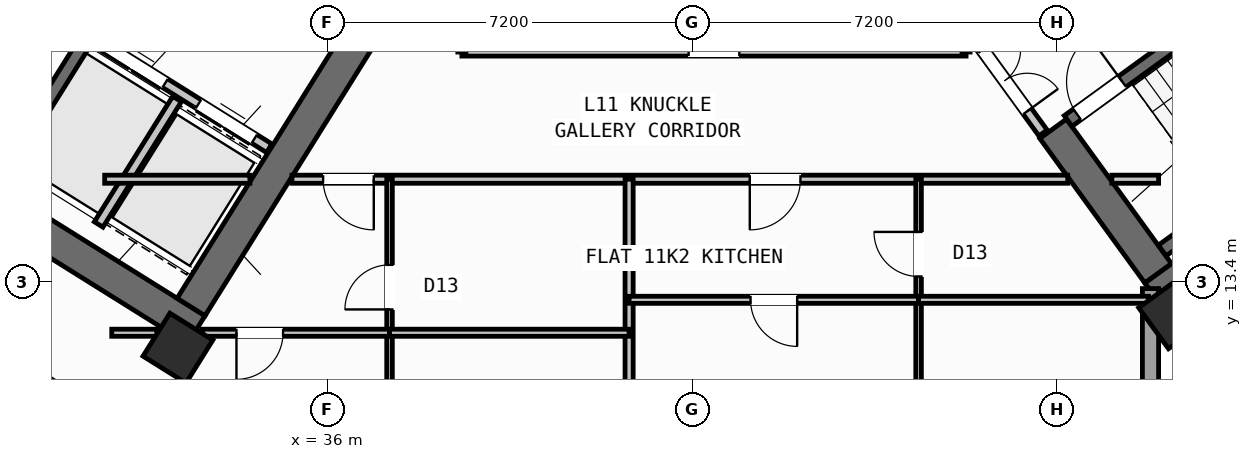
"""IFC4 building model, lengths in metres.
Left out: names, types, materials, properties, quantities, classifications, styles, units other than length and angle.
Written with IfcOpenShell. Run it as: python <this file> out.ifc"""

import sys

from ifc_helpers import new_model, si_unit, direction, frame, frame_2d, origin, origin_2d, place, context, subcontext, project, spatial, rectangle, hollow_rectangle, extrude, source, transform, mapped, element, fill, save


model = new_model("IFC4")
c1 = context("Model", 3, precision=1e-05, world=origin(), true_north=direction((0.0, 1.0)))
c2 = subcontext(c1, "Body", "Model", "MODEL_VIEW")
j1 = project(units=[si_unit("LENGTHUNIT", "METRE"), si_unit("PLANEANGLEUNIT", "RADIAN")], contexts=[c1])
p1 = place(None, origin())
s1 = spatial("IfcSite", under=j1, at=p1, CompositionType="ELEMENT")
p2 = place(p1, origin())
s2 = spatial("IfcBuilding", under=s1, at=p2, CompositionType="ELEMENT")
p3 = place(p2, frame((0.0, 0.0, 45.6)))
s3 = spatial("IfcBuildingStorey", under=s2, at=p3, CompositionType="ELEMENT", Elevation=45.6)
p4 = place(p3, frame((33.409, 12.45, 0.0), z_axis=(0.0, 0.0, 1.0), x_axis=(-0.848051132073, 0.529914405721, 0.0)))
e1 = element("IfcWall", 1, at=p4, inside=s3, PredefinedType="SHEAR", context=c2, shape_type="SweptSolid", body=[
    extrude(rectangle(XDim=13.24, YDim=0.65, at=frame_2d((6.62, 0.0))), origin(), (0.0, 0.0, 1.0), 3.35),
])
p5 = place(p3, frame((36.683, 18.304, 0.0), z_axis=(0.0, 0.0, 1.0), x_axis=(-0.529899109053, -0.848060690178, 0.0)))
e2 = element("IfcWall", 2, at=p5, inside=s3, PredefinedType="SHEAR", context=c2, shape_type="SweptSolid", body=[
    extrude(rectangle(XDim=6.375, YDim=0.65, at=frame_2d((3.188, 0.0))), origin(), (0.0, 0.0, 1.0), 3.35),
])
p6 = place(p3, frame((52.318, 13.11, 0.0), z_axis=(0.0, 0.0, 1.0), x_axis=(0.809019445368, 0.587781878776, 0.0)))
e3 = element("IfcWall", 3, at=p6, inside=s3, PredefinedType="SHEAR", context=c2, shape_type="SweptSolid", body=[
    extrude(rectangle(XDim=12.44, YDim=0.65, at=frame_2d((6.22, 0.0))), origin(), (0.0, 0.0, 1.0), 3.35),
])
p7 = place(p3, frame((52.39, 13.564, 0.0), z_axis=(0.0, 0.0, 1.0), x_axis=(-0.58779688989, 0.809008539037, 0.0)))
e4 = element("IfcWall", 4, at=p7, inside=s3, PredefinedType="SHEAR", context=c2, shape_type="SweptSolid", body=[
    extrude(rectangle(XDim=3.525, YDim=0.65, at=frame_2d((1.763, 0.0))), origin(), (0.0, 0.0, 1.0), 3.35),
])
m1 = source(origin(), c2, "Body", "SweptSolid", [
    extrude(hollow_rectangle(XDim=1.0, YDim=1.0, WallThickness=0.04, at=origin_2d()), origin(), (0.0, 0.0, 1.0), 3.6),
])
for number, where, z_axis, x_axis in (
    (5, (33.046, 12.087, 0.0), (0.0, 0.0, 1.0), (-0.848, 0.53, 0.0)),
    (6, (52.705, 12.773, 0.0), (0.0, 0.0, 1.0), (0.809, 0.588, 0.0)),
):
    element("IfcColumn", number, at=place(p3, frame(where, z_axis=z_axis, x_axis=x_axis)), inside=s3, PredefinedType="COLUMN", context=c2, shape_type="MappedRepresentation", body=[
        mapped(m1, transform((0.0, 0.0, 0.0), scale=1.0)),
    ])
p8 = place(p3, frame((56.581, 7.439, 0.0), z_axis=(0.0, 0.0, 1.0), x_axis=(-0.587785875463, 0.809016541614, 0.0)))
e7 = element("IfcWall", 7, at=p8, inside=s3, PredefinedType="STANDARD", context=c2, shape_type="SweptSolid", body=[
    extrude(rectangle(XDim=6.774, YDim=0.32, at=frame_2d((3.387, 0.0))), origin(), (0.0, 0.0, 1.0), 2.725),
])
p9 = place(p8, frame((1.556, 0.0, 0.8)))
e8 = element("IfcOpeningElement", 8, at=p9, cuts=e7, PredefinedType="OPENING", context=c2, shape_type="SweptSolid", body=[
    extrude(rectangle(XDim=2.1, YDim=1.55, at=frame_2d((1.05, 0.775))), frame((0.0, 0.17, 0.0), z_axis=(0.0, -1.0, 0.0), x_axis=(1.0, 0.0, 0.0)), (0.0, 0.0, 1.0), 0.34),
])
p10 = place(p3, frame((52.24, 13.261, 0.0), z_axis=(0.0, 0.0, 1.0), x_axis=(0.0, -1.0, 0.0)))
e9 = element("IfcWall", 9, at=p10, inside=s3, PredefinedType="STANDARD", context=c2, shape_type="SweptSolid", body=[
    extrude(rectangle(XDim=9.795, YDim=0.32, at=frame_2d((4.897, 0.0))), origin(), (0.0, 0.0, 1.0), 3.35),
])
p11 = place(p10, frame((2.349, 0.0, 0.8)))
e10 = element("IfcOpeningElement", 10, at=p11, cuts=e9, PredefinedType="OPENING", context=c2, shape_type="SweptSolid", body=[
    extrude(rectangle(XDim=2.1, YDim=1.55, at=frame_2d((1.05, 0.775))), frame((0.0, 0.17, 0.0), z_axis=(0.0, -1.0, 0.0), x_axis=(1.0, 0.0, 0.0)), (0.0, 0.0, 1.0), 0.34),
])
p12 = place(p10, frame((7.03, 0.0, 0.85)))
e11 = element("IfcOpeningElement", 11, at=p12, cuts=e9, PredefinedType="OPENING", context=c2, shape_type="SweptSolid", body=[
    extrude(rectangle(XDim=1.8, YDim=1.5, at=frame_2d((0.9, 0.75))), frame((0.0, 0.17, 0.0), z_axis=(0.0, -1.0, 0.0), x_axis=(1.0, 0.0, 0.0)), (0.0, 0.0, 1.0), 0.34),
])
p13 = place(p3, frame((31.288, 18.256, 0.0), z_axis=(0.0, 0.0, 1.0), x_axis=(-0.529943379326, -0.848033026897, 0.0)))
e12 = element("IfcWall", 12, at=p13, inside=s3, PredefinedType="SHEAR", context=c2, shape_type="SweptSolid", body=[
    extrude(rectangle(XDim=3.16, YDim=0.26, at=frame_2d((1.58, 0.0))), origin(), (0.0, 0.0, 1.0), 3.35),
])
p14 = place(p3, frame((34.848, 16.031, 0.0), z_axis=(0.0, 0.0, 1.0), x_axis=(-0.848044042236, 0.529925751807, 0.0)))
e13 = element("IfcWall", 13, at=p14, inside=s3, PredefinedType="STANDARD", context=c2, shape_type="SweptSolid", body=[
    extrude(rectangle(XDim=4.198, YDim=0.2, at=frame_2d((2.099, 0.0))), origin(), (0.0, 0.0, 1.0), 3.34),
])
p15 = place(p14, frame((0.348, 0.0, 0.0)))
e14 = element("IfcOpeningElement", 14, at=p15, cuts=e13, PredefinedType="OPENING", context=c2, shape_type="SweptSolid", body=[
    extrude(rectangle(XDim=1.3, YDim=2.2, at=frame_2d((0.65, 1.1))), frame((0.0, 0.11, 0.0), z_axis=(0.0, -1.0, 0.0), x_axis=(1.0, 0.0, 0.0)), (0.0, 0.0, 1.0), 0.22),
])
p16 = place(p14, frame((2.423, 0.0, 0.0)))
e15 = element("IfcOpeningElement", 15, at=p16, cuts=e13, PredefinedType="OPENING", context=c2, shape_type="SweptSolid", body=[
    extrude(rectangle(XDim=1.45, YDim=2.25, at=frame_2d((0.725, 1.125))), frame((0.0, 0.11, 0.0), z_axis=(0.0, -1.0, 0.0), x_axis=(1.0, 0.0, 0.0)), (0.0, 0.0, 1.0), 0.22),
])
p17 = place(p3, frame((33.029, 17.003, 0.0), z_axis=(0.0, 0.0, 1.0), x_axis=(-0.529916267533, -0.848049968695, 0.0)))
e16 = element("IfcWall", 16, at=p17, inside=s3, PredefinedType="STANDARD", context=c2, shape_type="SweptSolid", body=[
    extrude(rectangle(XDim=2.92, YDim=0.2, at=frame_2d((1.46, 0.0))), origin(), (0.0, 0.0, 1.0), 3.34),
])
p18 = place(p3, frame((52.472, 14.013, 0.0), z_axis=(0.0, 0.0, 1.0), x_axis=(0.809028366311, 0.587769599847, 0.0)))
e17 = element("IfcWall", 17, at=p18, inside=s3, PredefinedType="SHEAR", context=c2, shape_type="SweptSolid", body=[
    extrude(rectangle(XDim=7.33, YDim=0.26, at=frame_2d((3.665, 0.0))), origin(), (0.0, 0.0, 1.0), 3.35),
])
p19 = place(p3, frame((50.615, 16.57, 0.0), z_axis=(0.0, 0.0, 1.0), x_axis=(0.809028366311, 0.587769599847, 0.0)))
e18 = element("IfcWall", 18, at=p19, inside=s3, PredefinedType="SHEAR", context=c2, shape_type="SweptSolid", body=[
    extrude(rectangle(XDim=7.33, YDim=0.26, at=frame_2d((3.665, 0.0))), origin(), (0.0, 0.0, 1.0), 3.35),
])
p20 = place(p19, frame((0.22, 0.0, 0.0)))
e19 = element("IfcOpeningElement", 19, at=p20, cuts=e18, PredefinedType="OPENING", context=c2, shape_type="SweptSolid", body=[
    extrude(rectangle(XDim=1.1, YDim=2.1, at=frame_2d((0.55, 1.05))), frame((0.0, 0.14, 0.0), z_axis=(0.0, -1.0, 0.0), x_axis=(1.0, 0.0, 0.0)), (0.0, 0.0, 1.0), 0.28),
])
p21 = place(p3, frame((32.164, 10.374, 0.0), z_axis=(0.0, 0.0, 1.0), x_axis=(-0.848044107957, 0.529925646633, 0.0)))
e20 = element("IfcWall", 20, at=p21, inside=s3, PredefinedType="PARTITIONING", context=c2, shape_type="SweptSolid", body=[
    extrude(rectangle(XDim=15.57, YDim=0.16, at=frame_2d((7.785, 0.0))), origin(), (0.0, 0.0, 1.0), 3.34),
])
p22 = place(p21, frame((10.83, 0.0, 0.0)))
e21 = element("IfcOpeningElement", 21, at=p22, cuts=e20, PredefinedType="OPENING", context=c2, shape_type="SweptSolid", body=[
    extrude(rectangle(XDim=1.0, YDim=2.1, at=frame_2d((0.5, 1.05))), frame((0.0, 0.09, 0.0), z_axis=(0.0, -1.0, 0.0), x_axis=(1.0, 0.0, 0.0)), (0.0, 0.0, 1.0), 0.18),
])
p23 = place(p3, frame((31.6, 15.42, 0.0), z_axis=(0.0, 0.0, 1.0), x_axis=(1.0, 0.0, 0.0)))
e22 = element("IfcWall", 22, at=p23, inside=s3, PredefinedType="PARTITIONING", context=c2, shape_type="SweptSolid", body=[
    extrude(rectangle(XDim=2.866, YDim=0.16, at=frame_2d((1.433, 0.0))), origin(), (0.0, 0.0, 1.0), 3.34),
])
p24 = place(p3, frame((35.296, 15.42, 0.0), z_axis=(0.0, 0.0, 1.0), x_axis=(1.0, 0.0, 0.0)))
e23 = element("IfcWall", 23, at=p24, inside=s3, PredefinedType="PARTITIONING", context=c2, shape_type="SweptSolid", body=[
    extrude(rectangle(XDim=15.311, YDim=0.16, at=frame_2d((7.655, 0.0))), origin(), (0.0, 0.0, 1.0), 3.34),
])
p25 = place(p24, frame((0.615, 0.0, 0.0)))
e24 = element("IfcOpeningElement", 24, at=p25, cuts=e23, PredefinedType="OPENING", context=c2, shape_type="SweptSolid", body=[
    extrude(rectangle(XDim=1.0, YDim=2.1, at=frame_2d((0.5, 1.05))), frame((0.0, 0.09, 0.0), z_axis=(0.0, -1.0, 0.0), x_axis=(1.0, 0.0, 0.0)), (0.0, 0.0, 1.0), 0.18),
])
p26 = place(p24, frame((9.035, 0.0, 0.0)))
e25 = element("IfcOpeningElement", 25, at=p26, cuts=e23, PredefinedType="OPENING", context=c2, shape_type="SweptSolid", body=[
    extrude(rectangle(XDim=1.0, YDim=2.1, at=frame_2d((0.5, 1.05))), frame((0.0, 0.09, 0.0), z_axis=(0.0, -1.0, 0.0), x_axis=(1.0, 0.0, 0.0)), (0.0, 0.0, 1.0), 0.18),
])
p27 = place(p3, frame((51.477, 15.42, 0.0), z_axis=(0.0, 0.0, 1.0), x_axis=(1.0, 0.0, 0.0)))
e26 = element("IfcWall", 26, at=p27, inside=s3, PredefinedType="PARTITIONING", context=c2, shape_type="SweptSolid", body=[
    extrude(rectangle(XDim=0.923, YDim=0.16, at=frame_2d((0.461, 0.0))), origin(), (0.0, 0.0, 1.0), 3.34),
])
p28 = place(p3, frame((38.65, 17.93, 0.0), z_axis=(0.0, 0.0, 1.0), x_axis=(1.0, 0.0, 0.0)))
e27 = element("IfcWall", 27, at=p28, inside=s3, PredefinedType="PARTITIONING", context=c2, shape_type="SweptSolid", body=[
    extrude(rectangle(XDim=9.95, YDim=0.16, at=frame_2d((4.975, 0.0))), origin(), (0.0, 0.0, 1.0), 3.34),
])
p29 = place(p28, frame((4.475, 0.0, 0.0)))
e28 = element("IfcOpeningElement", 28, at=p29, cuts=e27, PredefinedType="OPENING", context=c2, shape_type="SweptSolid", body=[
    extrude(rectangle(XDim=1.0, YDim=2.1, at=frame_2d((0.5, 1.05))), frame((0.0, 0.09, 0.0), z_axis=(0.0, -1.0, 0.0), x_axis=(1.0, 0.0, 0.0)), (0.0, 0.0, 1.0), 0.18),
])
p30 = place(p3, frame((50.119, 16.333, 0.0), z_axis=(0.0, 0.0, 1.0), x_axis=(-0.587749856981, 0.809042709391, 0.0)))
e29 = element("IfcWall", 29, at=p30, inside=s3, PredefinedType="STANDARD", context=c2, shape_type="SweptSolid", body=[
    extrude(rectangle(XDim=2.96, YDim=0.2, at=frame_2d((1.48, 0.0))), origin(), (0.0, 0.0, 1.0), 3.34),
])
p31 = place(p30, frame((0.53, 0.0, 0.0)))
e30 = element("IfcOpeningElement", 30, at=p31, cuts=e29, PredefinedType="OPENING", context=c2, shape_type="SweptSolid", body=[
    extrude(rectangle(XDim=1.5, YDim=2.15, at=frame_2d((0.75, 1.075))), frame((0.0, 0.11, 0.0), z_axis=(0.0, -1.0, 0.0), x_axis=(1.0, 0.0, 0.0)), (0.0, 0.0, 1.0), 0.22),
])
p32 = place(p3, frame((41.95, 1.96, 0.0), z_axis=(0.0, 0.0, 1.0), x_axis=(0.0, 1.0, 0.0)))
e31 = element("IfcWall", 31, at=p32, inside=s3, PredefinedType="PARTITIONING", context=c2, shape_type="SweptSolid", body=[
    extrude(rectangle(XDim=13.46, YDim=0.16, at=frame_2d((6.73, 0.0))), origin(), (0.0, 0.0, 1.0), 3.34),
])
p33 = place(p3, frame((37.222, 1.96, 0.0), z_axis=(0.0, 0.0, 1.0), x_axis=(0.0, 1.0, 0.0)))
e32 = element("IfcWall", 32, at=p33, inside=s3, PredefinedType="PARTITIONING", context=c2, shape_type="SweptSolid", body=[
    extrude(rectangle(XDim=13.46, YDim=0.11, at=frame_2d((6.73, 0.0))), origin(), (0.0, 0.0, 1.0), 3.34),
])
p34 = place(p33, frame((5.2, 0.0, 0.0)))
e33 = element("IfcOpeningElement", 33, at=p34, cuts=e32, PredefinedType="OPENING", context=c2, shape_type="SweptSolid", body=[
    extrude(rectangle(XDim=0.92, YDim=2.08, at=frame_2d((0.46, 1.04))), frame((0.0, 0.065, 0.0), z_axis=(0.0, -1.0, 0.0), x_axis=(1.0, 0.0, 0.0)), (0.0, 0.0, 1.0), 0.13),
])
p35 = place(p33, frame((10.89, 0.0, 0.0)))
e34 = element("IfcOpeningElement", 34, at=p35, cuts=e32, PredefinedType="OPENING", context=c2, shape_type="SweptSolid", body=[
    extrude(rectangle(XDim=0.88, YDim=2.08, at=frame_2d((0.44, 1.04))), frame((0.0, 0.065, 0.0), z_axis=(0.0, -1.0, 0.0), x_axis=(1.0, 0.0, 0.0)), (0.0, 0.0, 1.0), 0.13),
])
p36 = place(p3, frame((31.74, 12.39, 0.0), z_axis=(0.0, 0.0, 1.0), x_axis=(1.0, 0.0, 0.0)))
e35 = element("IfcWall", 35, at=p36, inside=s3, PredefinedType="PLUMBINGWALL", context=c2, shape_type="SweptSolid", body=[
    extrude(rectangle(XDim=0.892, YDim=0.14, at=frame_2d((0.446, 0.0))), origin(), (0.0, 0.0, 1.0), 3.34),
])
p37 = place(p3, frame((33.527, 12.39, 0.0), z_axis=(0.0, 0.0, 1.0), x_axis=(1.0, 0.0, 0.0)))
e36 = element("IfcWall", 36, at=p37, inside=s3, PredefinedType="PLUMBINGWALL", context=c2, shape_type="SweptSolid", body=[
    extrude(rectangle(XDim=3.695, YDim=0.14, at=frame_2d((1.847, 0.0))), origin(), (0.0, 0.0, 1.0), 2.525),
])
p38 = place(p37, frame((0.674, 0.0, 0.0)))
e37 = element("IfcOpeningElement", 37, at=p38, cuts=e36, PredefinedType="OPENING", context=c2, shape_type="SweptSolid", body=[
    extrude(rectangle(XDim=0.92, YDim=2.08, at=frame_2d((0.46, 1.04))), frame((0.0, 0.08, 0.0), z_axis=(0.0, -1.0, 0.0), x_axis=(1.0, 0.0, 0.0)), (0.0, 0.0, 1.0), 0.16),
])
p39 = place(p3, frame((37.222, 12.39, 0.0), z_axis=(0.0, 0.0, 1.0), x_axis=(1.0, 0.0, 0.0)))
e38 = element("IfcWall", 38, at=p39, inside=s3, PredefinedType="PLUMBINGWALL", context=c2, shape_type="SweptSolid", body=[
    extrude(rectangle(XDim=4.728, YDim=0.14, at=frame_2d((2.364, 0.0))), origin(), (0.0, 0.0, 1.0), 2.525),
])
p40 = place(p3, frame((47.663, 1.96, 0.0), z_axis=(0.0, 0.0, 1.0), x_axis=(0.0, 1.0, 0.0)))
e39 = element("IfcWall", 39, at=p40, inside=s3, PredefinedType="PARTITIONING", context=c2, shape_type="SweptSolid", body=[
    extrude(rectangle(XDim=13.46, YDim=0.11, at=frame_2d((6.73, 0.0))), origin(), (0.0, 0.0, 1.0), 3.34),
])
p41 = place(p40, frame((6.3, 0.0, 0.0)))
e40 = element("IfcOpeningElement", 40, at=p41, cuts=e39, PredefinedType="OPENING", context=c2, shape_type="SweptSolid", body=[
    extrude(rectangle(XDim=0.92, YDim=2.08, at=frame_2d((0.46, 1.04))), frame((0.0, 0.065, 0.0), z_axis=(0.0, -1.0, 0.0), x_axis=(1.0, 0.0, 0.0)), (0.0, 0.0, 1.0), 0.13),
])
p42 = place(p40, frame((11.54, 0.0, 0.0)))
e41 = element("IfcOpeningElement", 41, at=p42, cuts=e39, PredefinedType="OPENING", context=c2, shape_type="SweptSolid", body=[
    extrude(rectangle(XDim=0.88, YDim=2.08, at=frame_2d((0.44, 1.04))), frame((0.0, 0.065, 0.0), z_axis=(0.0, -1.0, 0.0), x_axis=(1.0, 0.0, 0.0)), (0.0, 0.0, 1.0), 0.13),
])
p43 = place(p3, frame((41.95, 13.04, 0.0), z_axis=(0.0, 0.0, 1.0), x_axis=(1.0, 0.0, 0.0)))
e42 = element("IfcWall", 42, at=p43, inside=s3, PredefinedType="PLUMBINGWALL", context=c2, shape_type="SweptSolid", body=[
    extrude(rectangle(XDim=5.713, YDim=0.14, at=frame_2d((2.856, 0.0))), origin(), (0.0, 0.0, 1.0), 3.34),
])
p44 = place(p43, frame((2.396, 0.0, 0.0)))
e43 = element("IfcOpeningElement", 43, at=p44, cuts=e42, PredefinedType="OPENING", context=c2, shape_type="SweptSolid", body=[
    extrude(rectangle(XDim=0.92, YDim=2.08, at=frame_2d((0.46, 1.04))), frame((0.0, 0.08, 0.0), z_axis=(0.0, -1.0, 0.0), x_axis=(1.0, 0.0, 0.0)), (0.0, 0.0, 1.0), 0.16),
])
p45 = place(p3, frame((47.663, 13.04, 0.0), z_axis=(0.0, 0.0, 1.0), x_axis=(1.0, 0.0, 0.0)))
e44 = element("IfcWall", 44, at=p45, inside=s3, PredefinedType="PLUMBINGWALL", context=c2, shape_type="SweptSolid", body=[
    extrude(rectangle(XDim=4.538, YDim=0.14, at=frame_2d((2.269, 0.0))), origin(), (0.0, 0.0, 1.0), 2.525),
])
m2 = source(origin(), c2, "Body", "SweptSolid", [
    extrude(rectangle(XDim=1.3, YDim=2.2, at=frame_2d((0.65, 1.1))), frame((0.0, 0.025, 0.0), z_axis=(0.0, -1.0, 0.0), x_axis=(1.0, 0.0, 0.0)), (0.0, 0.0, 1.0), 0.05),
])
p46 = place(p15, origin())
e45 = element("IfcDoor", 45, at=p46, inside=s3, OperationType="DOUBLE_DOOR_SLIDING", PredefinedType="DOOR", context=c2, shape_type="MappedRepresentation", body=[
    mapped(m2, transform((0.0, 0.0, 0.0), scale=1.0)),
])
fill(e14, e45)
m3 = source(origin(), c2, "Body", "SweptSolid", [
    extrude(rectangle(XDim=1.45, YDim=2.25, at=frame_2d((0.725, 1.125))), frame((0.0, 0.025, 0.0), z_axis=(0.0, -1.0, 0.0), x_axis=(1.0, 0.0, 0.0)), (0.0, 0.0, 1.0), 0.05),
])
p47 = place(p16, origin())
e46 = element("IfcDoor", 46, at=p47, inside=s3, OperationType="DOUBLE_DOOR_SLIDING", PredefinedType="DOOR", context=c2, shape_type="MappedRepresentation", body=[
    mapped(m3, transform((0.0, 0.0, 0.0), scale=1.0)),
])
fill(e15, e46)
m4 = source(origin(), c2, "Body", "SweptSolid", [
    extrude(rectangle(XDim=1.1, YDim=2.1, at=frame_2d((0.55, 1.05))), frame((0.0, 0.025, 0.0), z_axis=(0.0, -1.0, 0.0), x_axis=(1.0, 0.0, 0.0)), (0.0, 0.0, 1.0), 0.05),
])
p48 = place(p20, origin())
e47 = element("IfcDoor", 47, at=p48, inside=s3, OperationType="SINGLE_SWING_RIGHT", PredefinedType="DOOR", context=c2, shape_type="MappedRepresentation", body=[
    mapped(m4, transform((0.0, 0.0, 0.0), scale=1.0)),
])
fill(e19, e47)
m5 = source(origin(), c2, "Body", "SweptSolid", [
    extrude(rectangle(XDim=1.0, YDim=2.1, at=frame_2d((0.5, 1.05))), frame((0.0, 0.025, 0.0), z_axis=(0.0, -1.0, 0.0), x_axis=(1.0, 0.0, 0.0)), (0.0, 0.0, 1.0), 0.05),
])
p49 = place(p29, origin())
e48 = element("IfcDoor", 48, at=p49, inside=s3, OperationType="SINGLE_SWING_RIGHT", PredefinedType="DOOR", context=c2, shape_type="MappedRepresentation", body=[
    mapped(m5, transform((0.0, 0.0, 0.0), scale=1.0)),
])
fill(e28, e48)
m6 = source(origin(), c2, "Body", "SweptSolid", [
    extrude(rectangle(XDim=1.5, YDim=2.15, at=frame_2d((0.75, 1.075))), frame((0.0, 0.025, 0.0), z_axis=(0.0, -1.0, 0.0), x_axis=(1.0, 0.0, 0.0)), (0.0, 0.0, 1.0), 0.05),
])
p50 = place(p31, frame((1.5, 0.0, 0.0), z_axis=(0.0, 0.0, 1.0), x_axis=(-1.0, 0.0, 0.0)))
e49 = element("IfcDoor", 49, at=p50, inside=s3, OperationType="DOUBLE_DOOR_SINGLE_SWING", PredefinedType="DOOR", context=c2, shape_type="MappedRepresentation", body=[
    mapped(m6, transform((0.0, 0.0, 0.0), scale=1.0)),
])
fill(e30, e49)
p51 = place(p25, frame((1.0, 0.0, 0.0), z_axis=(0.0, 0.0, 1.0), x_axis=(-1.0, 0.0, 0.0)))
e50 = element("IfcDoor", 50, at=p51, inside=s3, OperationType="SINGLE_SWING_LEFT", PredefinedType="DOOR", context=c2, shape_type="MappedRepresentation", body=[
    mapped(m5, transform((0.0, 0.0, 0.0), scale=1.0)),
])
fill(e24, e50)
m7 = source(origin(), c2, "Body", "SweptSolid", [
    extrude(rectangle(XDim=0.92, YDim=2.08, at=frame_2d((0.46, 1.04))), frame((0.0, 0.025, 0.0), z_axis=(0.0, -1.0, 0.0), x_axis=(1.0, 0.0, 0.0)), (0.0, 0.0, 1.0), 0.05),
])
p52 = place(p38, frame((0.92, 0.0, 0.0), z_axis=(0.0, 0.0, 1.0), x_axis=(-1.0, 0.0, 0.0)))
e51 = element("IfcDoor", 51, at=p52, inside=s3, OperationType="SINGLE_SWING_RIGHT", PredefinedType="DOOR", context=c2, shape_type="MappedRepresentation", body=[
    mapped(m7, transform((0.0, 0.0, 0.0), scale=1.0)),
])
fill(e37, e51)
m8 = source(origin(), c2, "Body", "SweptSolid", [
    extrude(rectangle(XDim=0.88, YDim=2.08, at=frame_2d((0.44, 1.04))), frame((0.0, 0.025, 0.0), z_axis=(0.0, -1.0, 0.0), x_axis=(1.0, 0.0, 0.0)), (0.0, 0.0, 1.0), 0.05),
])
p53 = place(p35, origin())
e52 = element("IfcDoor", 52, at=p53, inside=s3, OperationType="SINGLE_SWING_LEFT", PredefinedType="DOOR", context=c2, shape_type="MappedRepresentation", body=[
    mapped(m8, transform((0.0, 0.0, 0.0), scale=1.0)),
])
fill(e34, e52)
p54 = place(p26, frame((1.0, 0.0, 0.0), z_axis=(0.0, 0.0, 1.0), x_axis=(-1.0, 0.0, 0.0)))
e53 = element("IfcDoor", 53, at=p54, inside=s3, OperationType="SINGLE_SWING_RIGHT", PredefinedType="DOOR", context=c2, shape_type="MappedRepresentation", body=[
    mapped(m5, transform((0.0, 0.0, 0.0), scale=1.0)),
])
fill(e25, e53)
p55 = place(p44, frame((0.92, 0.0, 0.0), z_axis=(0.0, 0.0, 1.0), x_axis=(-1.0, 0.0, 0.0)))
e54 = element("IfcDoor", 54, at=p55, inside=s3, OperationType="SINGLE_SWING_LEFT", PredefinedType="DOOR", context=c2, shape_type="MappedRepresentation", body=[
    mapped(m7, transform((0.0, 0.0, 0.0), scale=1.0)),
])
fill(e43, e54)
p56 = place(p42, origin())
e55 = element("IfcDoor", 55, at=p56, inside=s3, OperationType="SINGLE_SWING_RIGHT", PredefinedType="DOOR", context=c2, shape_type="MappedRepresentation", body=[
    mapped(m8, transform((0.0, 0.0, 0.0), scale=1.0)),
])
fill(e41, e55)
save(model, sys.argv[1])
